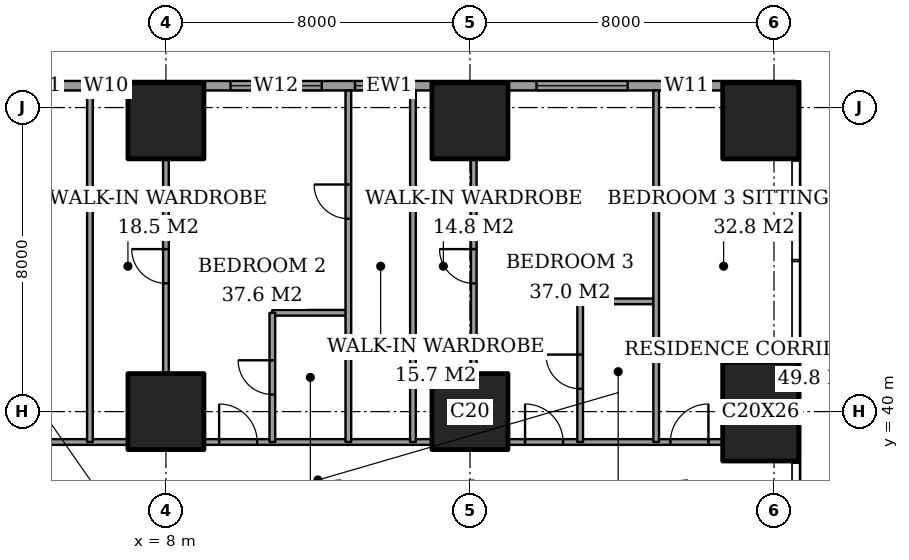
"""IFC4 building model, lengths in metres.
Left out: names, types, materials, properties, quantities, classifications, styles, units other than length and angle.
Written with IfcOpenShell. Run it as: python <this file> out.ifc"""

import sys

from ifc_helpers import new_model, si_unit, direction, frame, frame_2d, origin, origin_2d, place, context, subcontext, project, spatial, rectangle, extrude, element, fill, save


model = new_model("IFC4")
c1 = context("Model", 3, precision=1e-05, world=origin(), true_north=direction((0.0, 1.0)))
c2 = subcontext(c1, "Body", "Model", "MODEL_VIEW")
j1 = project(units=[si_unit("LENGTHUNIT", "METRE"), si_unit("PLANEANGLEUNIT", "RADIAN")], contexts=[c1])
p1 = place(None, origin())
s1 = spatial("IfcSite", under=j1, at=p1, CompositionType="ELEMENT")
p2 = place(p1, origin())
s2 = spatial("IfcBuilding", under=s1, at=p2, CompositionType="ELEMENT")
p3 = place(p2, frame((0.0, 0.0, 107.0)))
s3 = spatial("IfcBuildingStorey", under=s2, at=p3, CompositionType="ELEMENT", Elevation=107.0)
for number, where, z_axis, x_axis in (
    (1, (8.0, 40.0, 0.0), (0.0, 0.0, 1.0), (1.0, 0.0, 0.0)),
    (2, (8.0, 47.65, 0.0), (0.0, 0.0, 1.0), (1.0, 0.0, 0.0)),
    (3, (16.0, 40.0, 0.0), (0.0, 0.0, 1.0), (1.0, 0.0, 0.0)),
    (4, (16.0, 47.65, 0.0), (0.0, 0.0, 1.0), (1.0, 0.0, 0.0)),
):
    element("IfcColumn", number, at=place(p3, frame(where, z_axis=z_axis, x_axis=x_axis)), inside=s3, PredefinedType="COLUMN", context=c2, shape_type="SweptSolid", body=[
        extrude(rectangle(XDim=2.0, YDim=2.0, at=origin_2d()), origin(), (0.0, 0.0, 1.0), 3.6),
    ])
p4 = place(p3, frame((23.65, 40.0, 0.0), z_axis=(0.0, 0.0, 1.0), x_axis=(1.0, 0.0, 0.0)))
e5 = element("IfcColumn", 5, at=p4, inside=s3, PredefinedType="COLUMN", context=c2, shape_type="SweptSolid", body=[
    extrude(rectangle(XDim=2.0, YDim=2.6, at=origin_2d()), origin(), (0.0, 0.0, 1.0), 3.6),
])
p5 = place(p3, frame((23.65, 47.65, 0.0), z_axis=(0.0, 0.0, 1.0), x_axis=(1.0, 0.0, 0.0)))
e6 = element("IfcColumn", 6, at=p5, inside=s3, PredefinedType="COLUMN", context=c2, shape_type="SweptSolid", body=[
    extrude(rectangle(XDim=2.0, YDim=2.0, at=origin_2d()), origin(), (0.0, 0.0, 1.0), 3.6),
])
p6 = place(p3, frame((24.575, 48.575, 0.0), z_axis=(0.0, 0.0, 1.0), x_axis=(-1.0, 0.0, 0.0)))
e7 = element("IfcWall", 7, at=p6, inside=s3, PredefinedType="SOLIDWALL", context=c2, shape_type="SweptSolid", body=[
    extrude(rectangle(XDim=21.4, YDim=0.25, at=frame_2d((10.7, 0.0))), origin(), (0.0, 0.0, 1.0), 3.6),
])
p7 = place(p6, frame((2.275, 0.0, 0.4)))
e8 = element("IfcOpeningElement", 8, at=p7, cuts=e7, PredefinedType="OPENING", context=c2, shape_type="SweptSolid", body=[
    extrude(rectangle(XDim=1.2, YDim=2.2, at=frame_2d((0.6, 1.1))), frame((0.0, 0.135, 0.0), z_axis=(0.0, -1.0, 0.0), x_axis=(1.0, 0.0, 0.0)), (0.0, 0.0, 1.0), 0.27),
])
p8 = place(p6, frame((4.425, 0.0, 0.4)))
e9 = element("IfcOpeningElement", 9, at=p8, cuts=e7, PredefinedType="OPENING", context=c2, shape_type="SweptSolid", body=[
    extrude(rectangle(XDim=2.4, YDim=2.2, at=frame_2d((1.2, 1.1))), frame((0.0, 0.135, 0.0), z_axis=(0.0, -1.0, 0.0), x_axis=(1.0, 0.0, 0.0)), (0.0, 0.0, 1.0), 0.27),
])
p9 = place(p6, frame((10.4, 0.0, 0.4)))
e10 = element("IfcOpeningElement", 10, at=p9, cuts=e7, PredefinedType="OPENING", context=c2, shape_type="SweptSolid", body=[
    extrude(rectangle(XDim=1.2, YDim=2.2, at=frame_2d((0.6, 1.1))), frame((0.0, 0.135, 0.0), z_axis=(0.0, -1.0, 0.0), x_axis=(1.0, 0.0, 0.0)), (0.0, 0.0, 1.0), 0.27),
])
p10 = place(p6, frame((12.475, 0.0, 0.4)))
e11 = element("IfcOpeningElement", 11, at=p10, cuts=e7, PredefinedType="OPENING", context=c2, shape_type="SweptSolid", body=[
    extrude(rectangle(XDim=2.4, YDim=2.2, at=frame_2d((1.2, 1.1))), frame((0.0, 0.135, 0.0), z_axis=(0.0, -1.0, 0.0), x_axis=(1.0, 0.0, 0.0)), (0.0, 0.0, 1.0), 0.27),
])
p11 = place(p6, frame((17.85, 0.0, 0.4)))
e12 = element("IfcOpeningElement", 12, at=p11, cuts=e7, PredefinedType="OPENING", context=c2, shape_type="SweptSolid", body=[
    extrude(rectangle(XDim=0.6, YDim=2.2, at=frame_2d((0.3, 1.1))), frame((0.0, 0.135, 0.0), z_axis=(0.0, -1.0, 0.0), x_axis=(1.0, 0.0, 0.0)), (0.0, 0.0, 1.0), 0.27),
])
p12 = place(p6, frame((19.325, 0.0, 0.4)))
e13 = element("IfcOpeningElement", 13, at=p12, cuts=e7, PredefinedType="OPENING", context=c2, shape_type="SweptSolid", body=[
    extrude(rectangle(XDim=1.2, YDim=2.2, at=frame_2d((0.6, 1.1))), frame((0.0, 0.135, 0.0), z_axis=(0.0, -1.0, 0.0), x_axis=(1.0, 0.0, 0.0)), (0.0, 0.0, 1.0), 0.27),
])
p13 = place(p3, frame((1.35, 39.2, 0.0), z_axis=(0.0, 0.0, 1.0), x_axis=(1.0, 0.0, 0.0)))
e14 = element("IfcWall", 14, at=p13, inside=s3, PredefinedType="PARTITIONING", context=c2, shape_type="SweptSolid", body=[
    extrude(rectangle(XDim=5.65, YDim=0.15, at=frame_2d((2.825, 0.0))), origin(), (0.0, 0.0, 1.0), 3.35),
])
p14 = place(p13, frame((1.825, 0.0, 0.0)))
e15 = element("IfcOpeningElement", 15, at=p14, cuts=e14, PredefinedType="OPENING", context=c2, shape_type="SweptSolid", body=[
    extrude(rectangle(XDim=1.0, YDim=2.1, at=frame_2d((0.5, 1.05))), frame((0.0, 0.085, 0.0), z_axis=(0.0, -1.0, 0.0), x_axis=(1.0, 0.0, 0.0)), (0.0, 0.0, 1.0), 0.17),
])
p15 = place(p3, frame((9.0, 39.2, 0.0), z_axis=(0.0, 0.0, 1.0), x_axis=(1.0, 0.0, 0.0)))
e16 = element("IfcWall", 16, at=p15, inside=s3, PredefinedType="PARTITIONING", context=c2, shape_type="SweptSolid", body=[
    extrude(rectangle(XDim=6.0, YDim=0.15, at=frame_2d((3.0, 0.0))), origin(), (0.0, 0.0, 1.0), 3.35),
])
p16 = place(p15, frame((0.4, 0.0, 0.0)))
e17 = element("IfcOpeningElement", 17, at=p16, cuts=e16, PredefinedType="OPENING", context=c2, shape_type="SweptSolid", body=[
    extrude(rectangle(XDim=1.0, YDim=2.1, at=frame_2d((0.5, 1.05))), frame((0.0, 0.085, 0.0), z_axis=(0.0, -1.0, 0.0), x_axis=(1.0, 0.0, 0.0)), (0.0, 0.0, 1.0), 0.17),
])
p17 = place(p3, frame((17.0, 39.2, 0.0), z_axis=(0.0, 0.0, 1.0), x_axis=(1.0, 0.0, 0.0)))
e18 = element("IfcWall", 18, at=p17, inside=s3, PredefinedType="PARTITIONING", context=c2, shape_type="SweptSolid", body=[
    extrude(rectangle(XDim=5.65, YDim=0.15, at=frame_2d((2.825, 0.0))), origin(), (0.0, 0.0, 1.0), 3.35),
])
p18 = place(p17, frame((0.45, 0.0, 0.0)))
e19 = element("IfcOpeningElement", 19, at=p18, cuts=e18, PredefinedType="OPENING", context=c2, shape_type="SweptSolid", body=[
    extrude(rectangle(XDim=1.0, YDim=2.1, at=frame_2d((0.5, 1.05))), frame((0.0, 0.085, 0.0), z_axis=(0.0, -1.0, 0.0), x_axis=(1.0, 0.0, 0.0)), (0.0, 0.0, 1.0), 0.17),
])
p19 = place(p17, frame((4.275, 0.0, 0.0)))
e20 = element("IfcOpeningElement", 20, at=p19, cuts=e18, PredefinedType="OPENING", context=c2, shape_type="SweptSolid", body=[
    extrude(rectangle(XDim=1.0, YDim=2.1, at=frame_2d((0.5, 1.05))), frame((0.0, 0.085, 0.0), z_axis=(0.0, -1.0, 0.0), x_axis=(1.0, 0.0, 0.0)), (0.0, 0.0, 1.0), 0.17),
])
for number, where, z_axis, x_axis in (
    (21, (10.8, 42.6, 0.0), (0.0, 0.0, 1.0), (1.0, 0.0, 0.0)),
    (22, (18.9, 42.9, 0.0), (0.0, 0.0, 1.0), (1.0, 0.0, 0.0)),
):
    element("IfcWall", number, at=place(p3, frame(where, z_axis=z_axis, x_axis=x_axis)), inside=s3, PredefinedType="PARTITIONING", context=c2, shape_type="SweptSolid", body=[
        extrude(rectangle(XDim=2.0, YDim=0.15, at=frame_2d((1.0, 0.0))), origin(), (0.0, 0.0, 1.0), 3.35),
    ])
p20 = place(p3, frame((6.0, 39.2, 0.0), z_axis=(0.0, 0.0, 1.0), x_axis=(0.0, 1.0, 0.0)))
e23 = element("IfcWall", 23, at=p20, inside=s3, PredefinedType="PARTITIONING", context=c2, shape_type="SweptSolid", body=[
    extrude(rectangle(XDim=9.25, YDim=0.15, at=frame_2d((4.625, 0.0))), origin(), (0.0, 0.0, 1.0), 3.35),
])
p21 = place(p3, frame((8.0, 41.0, 0.0), z_axis=(0.0, 0.0, 1.0), x_axis=(0.0, 1.0, 0.0)))
e24 = element("IfcWall", 24, at=p21, inside=s3, PredefinedType="PARTITIONING", context=c2, shape_type="SweptSolid", body=[
    extrude(rectangle(XDim=5.65, YDim=0.15, at=frame_2d((2.825, 0.0))), origin(), (0.0, 0.0, 1.0), 3.35),
])
p22 = place(p21, frame((2.375, 0.0, 0.0)))
e25 = element("IfcOpeningElement", 25, at=p22, cuts=e24, PredefinedType="OPENING", context=c2, shape_type="SweptSolid", body=[
    extrude(rectangle(XDim=0.9, YDim=2.1, at=frame_2d((0.45, 1.05))), frame((0.0, 0.085, 0.0), z_axis=(0.0, -1.0, 0.0), x_axis=(1.0, 0.0, 0.0)), (0.0, 0.0, 1.0), 0.17),
])
p23 = place(p3, frame((10.8, 39.2, 0.0), z_axis=(0.0, 0.0, 1.0), x_axis=(0.0, 1.0, 0.0)))
e26 = element("IfcWall", 26, at=p23, inside=s3, PredefinedType="PARTITIONING", context=c2, shape_type="SweptSolid", body=[
    extrude(rectangle(XDim=3.4, YDim=0.15, at=frame_2d((1.7, 0.0))), origin(), (0.0, 0.0, 1.0), 3.35),
])
p24 = place(p23, frame((1.25, 0.0, 0.0)))
e27 = element("IfcOpeningElement", 27, at=p24, cuts=e26, PredefinedType="OPENING", context=c2, shape_type="SweptSolid", body=[
    extrude(rectangle(XDim=0.9, YDim=2.1, at=frame_2d((0.45, 1.05))), frame((0.0, 0.085, 0.0), z_axis=(0.0, -1.0, 0.0), x_axis=(1.0, 0.0, 0.0)), (0.0, 0.0, 1.0), 0.17),
])
p25 = place(p3, frame((12.8, 39.2, 0.0), z_axis=(0.0, 0.0, 1.0), x_axis=(0.0, 1.0, 0.0)))
e28 = element("IfcWall", 28, at=p25, inside=s3, PredefinedType="PARTITIONING", context=c2, shape_type="SweptSolid", body=[
    extrude(rectangle(XDim=9.25, YDim=0.15, at=frame_2d((4.625, 0.0))), origin(), (0.0, 0.0, 1.0), 3.35),
])
p26 = place(p25, frame((5.875, 0.0, 0.0)))
e29 = element("IfcOpeningElement", 29, at=p26, cuts=e28, PredefinedType="OPENING", context=c2, shape_type="SweptSolid", body=[
    extrude(rectangle(XDim=0.9, YDim=2.1, at=frame_2d((0.45, 1.05))), frame((0.0, 0.085, 0.0), z_axis=(0.0, -1.0, 0.0), x_axis=(1.0, 0.0, 0.0)), (0.0, 0.0, 1.0), 0.17),
])
p27 = place(p3, frame((14.5, 39.2, 0.0), z_axis=(0.0, 0.0, 1.0), x_axis=(0.0, 1.0, 0.0)))
e30 = element("IfcWall", 30, at=p27, inside=s3, PredefinedType="PARTITIONING", context=c2, shape_type="SweptSolid", body=[
    extrude(rectangle(XDim=9.25, YDim=0.15, at=frame_2d((4.625, 0.0))), origin(), (0.0, 0.0, 1.0), 3.35),
])
p28 = place(p3, frame((16.1, 41.0, 0.0), z_axis=(0.0, 0.0, 1.0), x_axis=(0.0, 1.0, 0.0)))
e31 = element("IfcWall", 31, at=p28, inside=s3, PredefinedType="PARTITIONING", context=c2, shape_type="SweptSolid", body=[
    extrude(rectangle(XDim=5.65, YDim=0.15, at=frame_2d((2.825, 0.0))), origin(), (0.0, 0.0, 1.0), 3.35),
])
p29 = place(p28, frame((2.375, 0.0, 0.0)))
e32 = element("IfcOpeningElement", 32, at=p29, cuts=e31, PredefinedType="OPENING", context=c2, shape_type="SweptSolid", body=[
    extrude(rectangle(XDim=0.9, YDim=2.1, at=frame_2d((0.45, 1.05))), frame((0.0, 0.085, 0.0), z_axis=(0.0, -1.0, 0.0), x_axis=(1.0, 0.0, 0.0)), (0.0, 0.0, 1.0), 0.17),
])
p30 = place(p3, frame((18.9, 39.2, 0.0), z_axis=(0.0, 0.0, 1.0), x_axis=(0.0, 1.0, 0.0)))
e33 = element("IfcWall", 33, at=p30, inside=s3, PredefinedType="PARTITIONING", context=c2, shape_type="SweptSolid", body=[
    extrude(rectangle(XDim=3.7, YDim=0.15, at=frame_2d((1.85, 0.0))), origin(), (0.0, 0.0, 1.0), 3.35),
])
p31 = place(p30, frame((1.4, 0.0, 0.0)))
e34 = element("IfcOpeningElement", 34, at=p31, cuts=e33, PredefinedType="OPENING", context=c2, shape_type="SweptSolid", body=[
    extrude(rectangle(XDim=0.9, YDim=2.1, at=frame_2d((0.45, 1.05))), frame((0.0, 0.085, 0.0), z_axis=(0.0, -1.0, 0.0), x_axis=(1.0, 0.0, 0.0)), (0.0, 0.0, 1.0), 0.17),
])
p32 = place(p3, frame((20.9, 39.2, 0.0), z_axis=(0.0, 0.0, 1.0), x_axis=(0.0, 1.0, 0.0)))
e35 = element("IfcWall", 35, at=p32, inside=s3, PredefinedType="PARTITIONING", context=c2, shape_type="SweptSolid", body=[
    extrude(rectangle(XDim=9.25, YDim=0.15, at=frame_2d((4.625, 0.0))), origin(), (0.0, 0.0, 1.0), 3.35),
])
p33 = place(p7, origin())
e36 = element("IfcWindow", 36, at=p33, inside=s3, PartitioningType="SINGLE_PANEL", PredefinedType="WINDOW", context=c2, shape_type="SweptSolid", body=[
    extrude(rectangle(XDim=1.2, YDim=2.2, at=frame_2d((0.6, 1.1))), frame((0.0, 0.03, 0.0), z_axis=(0.0, -1.0, 0.0), x_axis=(1.0, 0.0, 0.0)), (0.0, 0.0, 1.0), 0.06),
])
fill(e8, e36)
p34 = place(p8, origin())
e37 = element("IfcWindow", 37, at=p34, inside=s3, PartitioningType="SINGLE_PANEL", PredefinedType="WINDOW", context=c2, shape_type="SweptSolid", body=[
    extrude(rectangle(XDim=2.4, YDim=2.2, at=frame_2d((1.2, 1.1))), frame((0.0, 0.03, 0.0), z_axis=(0.0, -1.0, 0.0), x_axis=(1.0, 0.0, 0.0)), (0.0, 0.0, 1.0), 0.06),
])
fill(e9, e37)
p35 = place(p9, origin())
e38 = element("IfcWindow", 38, at=p35, inside=s3, PartitioningType="SINGLE_PANEL", PredefinedType="WINDOW", context=c2, shape_type="SweptSolid", body=[
    extrude(rectangle(XDim=1.2, YDim=2.2, at=frame_2d((0.6, 1.1))), frame((0.0, 0.03, 0.0), z_axis=(0.0, -1.0, 0.0), x_axis=(1.0, 0.0, 0.0)), (0.0, 0.0, 1.0), 0.06),
])
fill(e10, e38)
p36 = place(p10, origin())
e39 = element("IfcWindow", 39, at=p36, inside=s3, PartitioningType="SINGLE_PANEL", PredefinedType="WINDOW", context=c2, shape_type="SweptSolid", body=[
    extrude(rectangle(XDim=2.4, YDim=2.2, at=frame_2d((1.2, 1.1))), frame((0.0, 0.03, 0.0), z_axis=(0.0, -1.0, 0.0), x_axis=(1.0, 0.0, 0.0)), (0.0, 0.0, 1.0), 0.06),
])
fill(e11, e39)
p37 = place(p11, origin())
e40 = element("IfcWindow", 40, at=p37, inside=s3, PartitioningType="SINGLE_PANEL", PredefinedType="WINDOW", context=c2, shape_type="SweptSolid", body=[
    extrude(rectangle(XDim=0.6, YDim=2.2, at=frame_2d((0.3, 1.1))), frame((0.0, 0.03, 0.0), z_axis=(0.0, -1.0, 0.0), x_axis=(1.0, 0.0, 0.0)), (0.0, 0.0, 1.0), 0.06),
])
fill(e12, e40)
p38 = place(p12, origin())
e41 = element("IfcWindow", 41, at=p38, inside=s3, PartitioningType="SINGLE_PANEL", PredefinedType="WINDOW", context=c2, shape_type="SweptSolid", body=[
    extrude(rectangle(XDim=1.2, YDim=2.2, at=frame_2d((0.6, 1.1))), frame((0.0, 0.03, 0.0), z_axis=(0.0, -1.0, 0.0), x_axis=(1.0, 0.0, 0.0)), (0.0, 0.0, 1.0), 0.06),
])
fill(e13, e41)
p39 = place(p22, origin())
e42 = element("IfcDoor", 42, at=p39, inside=s3, OperationType="SINGLE_SWING_LEFT", PredefinedType="DOOR", context=c2, shape_type="SweptSolid", body=[
    extrude(rectangle(XDim=0.9, YDim=2.1, at=frame_2d((0.45, 1.05))), frame((0.0, 0.025, 0.0), z_axis=(0.0, -1.0, 0.0), x_axis=(1.0, 0.0, 0.0)), (0.0, 0.0, 1.0), 0.05),
])
fill(e25, e42)
p40 = place(p24, origin())
e43 = element("IfcDoor", 43, at=p40, inside=s3, OperationType="SINGLE_SWING_LEFT", PredefinedType="DOOR", context=c2, shape_type="SweptSolid", body=[
    extrude(rectangle(XDim=0.9, YDim=2.1, at=frame_2d((0.45, 1.05))), frame((0.0, 0.025, 0.0), z_axis=(0.0, -1.0, 0.0), x_axis=(1.0, 0.0, 0.0)), (0.0, 0.0, 1.0), 0.05),
])
fill(e27, e43)
p41 = place(p16, origin())
e44 = element("IfcDoor", 44, at=p41, inside=s3, OperationType="SINGLE_SWING_RIGHT", PredefinedType="DOOR", context=c2, shape_type="SweptSolid", body=[
    extrude(rectangle(XDim=1.0, YDim=2.1, at=frame_2d((0.5, 1.05))), frame((0.0, 0.025, 0.0), z_axis=(0.0, -1.0, 0.0), x_axis=(1.0, 0.0, 0.0)), (0.0, 0.0, 1.0), 0.05),
])
fill(e17, e44)
p42 = place(p26, origin())
e45 = element("IfcDoor", 45, at=p42, inside=s3, OperationType="SINGLE_SWING_LEFT", PredefinedType="DOOR", context=c2, shape_type="SweptSolid", body=[
    extrude(rectangle(XDim=0.9, YDim=2.1, at=frame_2d((0.45, 1.05))), frame((0.0, 0.025, 0.0), z_axis=(0.0, -1.0, 0.0), x_axis=(1.0, 0.0, 0.0)), (0.0, 0.0, 1.0), 0.05),
])
fill(e29, e45)
p43 = place(p29, origin())
e46 = element("IfcDoor", 46, at=p43, inside=s3, OperationType="SINGLE_SWING_LEFT", PredefinedType="DOOR", context=c2, shape_type="SweptSolid", body=[
    extrude(rectangle(XDim=0.9, YDim=2.1, at=frame_2d((0.45, 1.05))), frame((0.0, 0.025, 0.0), z_axis=(0.0, -1.0, 0.0), x_axis=(1.0, 0.0, 0.0)), (0.0, 0.0, 1.0), 0.05),
])
fill(e32, e46)
p44 = place(p31, origin())
e47 = element("IfcDoor", 47, at=p44, inside=s3, OperationType="SINGLE_SWING_LEFT", PredefinedType="DOOR", context=c2, shape_type="SweptSolid", body=[
    extrude(rectangle(XDim=0.9, YDim=2.1, at=frame_2d((0.45, 1.05))), frame((0.0, 0.025, 0.0), z_axis=(0.0, -1.0, 0.0), x_axis=(1.0, 0.0, 0.0)), (0.0, 0.0, 1.0), 0.05),
])
fill(e34, e47)
p45 = place(p18, origin())
e48 = element("IfcDoor", 48, at=p45, inside=s3, OperationType="SINGLE_SWING_RIGHT", PredefinedType="DOOR", context=c2, shape_type="SweptSolid", body=[
    extrude(rectangle(XDim=1.0, YDim=2.1, at=frame_2d((0.5, 1.05))), frame((0.0, 0.025, 0.0), z_axis=(0.0, -1.0, 0.0), x_axis=(1.0, 0.0, 0.0)), (0.0, 0.0, 1.0), 0.05),
])
fill(e19, e48)
p46 = place(p19, origin())
e49 = element("IfcDoor", 49, at=p46, inside=s3, OperationType="SINGLE_SWING_LEFT", PredefinedType="DOOR", context=c2, shape_type="SweptSolid", body=[
    extrude(rectangle(XDim=1.0, YDim=2.1, at=frame_2d((0.5, 1.05))), frame((0.0, 0.025, 0.0), z_axis=(0.0, -1.0, 0.0), x_axis=(1.0, 0.0, 0.0)), (0.0, 0.0, 1.0), 0.05),
])
fill(e20, e49)
save(model, sys.argv[1])
